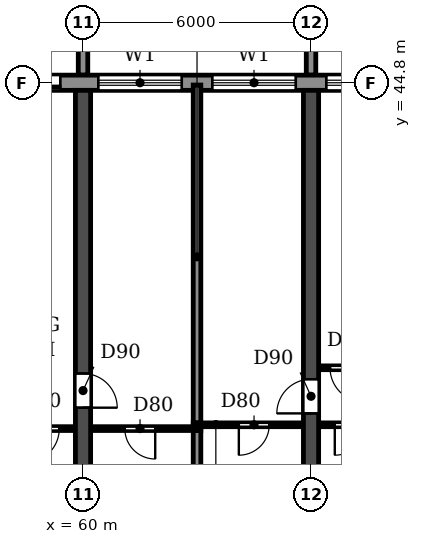
"""IFC4 building model, lengths in metres.
Left out: names, types, materials, properties, quantities, classifications, styles, units other than length and angle.
Written with IfcOpenShell. Run it as: python <this file> out.ifc"""

import sys

from ifc_helpers import new_model, si_unit, direction, frame, frame_2d, origin, place, context, subcontext, project, spatial, polyline, rectangle, outline, extrude, source, transform, mapped, element, fill, save


model = new_model("IFC4")
c1 = context("Model", 3, precision=1e-05, world=origin(), true_north=direction((0.0, 1.0)))
c2 = subcontext(c1, "Body", "Model", "MODEL_VIEW")
j1 = project(units=[si_unit("LENGTHUNIT", "METRE"), si_unit("PLANEANGLEUNIT", "RADIAN")], contexts=[c1])
p1 = place(None, origin())
s1 = spatial("IfcSite", under=j1, at=p1, CompositionType="ELEMENT")
p2 = place(p1, origin())
s2 = spatial("IfcBuilding", under=s1, at=p2, CompositionType="ELEMENT")
p3 = place(p2, frame((0.0, 0.0, 49.8)))
s3 = spatial("IfcBuildingStorey", under=s2, at=p3, CompositionType="ELEMENT", Elevation=49.8)
p4 = place(p3, frame((60.0, 30.55, 0.0), z_axis=(0.0, 0.0, 1.0), x_axis=(0.0, 1.0, 0.0)))
e1 = element("IfcWall", 1, at=p4, inside=s3, PredefinedType="SHEAR", context=c2, shape_type="SweptSolid", body=[
    extrude(rectangle(XDim=14.05, YDim=0.4, at=frame_2d((7.025, 0.0))), origin(), (0.0, 0.0, 1.0), 3.0),
])
p5 = place(p4, frame((5.7, 0.0, 0.0)))
e2 = element("IfcOpeningElement", 2, at=p5, cuts=e1, PredefinedType="OPENING", context=c2, shape_type="SweptSolid", body=[
    extrude(rectangle(XDim=0.9, YDim=2.1, at=frame_2d((0.45, 1.05))), frame((0.0, 0.21, 0.0), z_axis=(0.0, -1.0, 0.0), x_axis=(1.0, 0.0, 0.0)), (0.0, 0.0, 1.0), 0.42),
])
p6 = place(p3, frame((66.0, 30.55, 0.0), z_axis=(0.0, 0.0, 1.0), x_axis=(0.0, 1.0, 0.0)))
e3 = element("IfcWall", 3, at=p6, inside=s3, PredefinedType="SHEAR", context=c2, shape_type="SweptSolid", body=[
    extrude(rectangle(XDim=14.05, YDim=0.4, at=frame_2d((7.025, 0.0))), origin(), (0.0, 0.0, 1.0), 3.0),
])
p7 = place(p6, frame((5.55, 0.0, 0.0)))
e4 = element("IfcOpeningElement", 4, at=p7, cuts=e3, PredefinedType="OPENING", context=c2, shape_type="SweptSolid", body=[
    extrude(rectangle(XDim=0.9, YDim=2.1, at=frame_2d((0.45, 1.05))), frame((0.0, 0.21, 0.0), z_axis=(0.0, -1.0, 0.0), x_axis=(1.0, 0.0, 0.0)), (0.0, 0.0, 1.0), 0.42),
])
p8 = place(p3, frame((97.317, 44.8, 0.0), z_axis=(0.0, 0.0, 1.0), x_axis=(-1.0, 0.0, 0.0)))
e5 = element("IfcWall", 5, at=p8, inside=s3, PredefinedType="STANDARD", context=c2, shape_type="SweptSolid", body=[
    extrude(rectangle(XDim=92.634, YDim=0.4, at=frame_2d((46.317, 0.0))), origin(), (0.0, 0.0, 1.0), 3.0),
])
p9 = place(p8, frame((88.917, 0.0, 0.0)))
e6 = element("IfcOpeningElement", 6, at=p9, cuts=e5, PredefinedType="OPENING", context=c2, shape_type="SweptSolid", body=[
    extrude(rectangle(XDim=1.8, YDim=2.4, at=frame_2d((0.9, 1.2))), frame((0.0, 0.21, 0.0), z_axis=(0.0, -1.0, 0.0), x_axis=(1.0, 0.0, 0.0)), (0.0, 0.0, 1.0), 0.42),
])
p10 = place(p8, frame((85.717, 0.0, 0.9)))
e7 = element("IfcOpeningElement", 7, at=p10, cuts=e5, PredefinedType="OPENING", context=c2, shape_type="SweptSolid", body=[
    extrude(rectangle(XDim=2.2, YDim=1.5, at=frame_2d((1.1, 0.75))), frame((0.0, 0.21, 0.0), z_axis=(0.0, -1.0, 0.0), x_axis=(1.0, 0.0, 0.0)), (0.0, 0.0, 1.0), 0.42),
])
p11 = place(p8, frame((82.717, 0.0, 0.9)))
e8 = element("IfcOpeningElement", 8, at=p11, cuts=e5, PredefinedType="OPENING", context=c2, shape_type="SweptSolid", body=[
    extrude(rectangle(XDim=2.2, YDim=1.5, at=frame_2d((1.1, 0.75))), frame((0.0, 0.21, 0.0), z_axis=(0.0, -1.0, 0.0), x_axis=(1.0, 0.0, 0.0)), (0.0, 0.0, 1.0), 0.42),
])
p12 = place(p8, frame((79.717, 0.0, 0.9)))
e9 = element("IfcOpeningElement", 9, at=p12, cuts=e5, PredefinedType="OPENING", context=c2, shape_type="SweptSolid", body=[
    extrude(rectangle(XDim=2.2, YDim=1.5, at=frame_2d((1.1, 0.75))), frame((0.0, 0.21, 0.0), z_axis=(0.0, -1.0, 0.0), x_axis=(1.0, 0.0, 0.0)), (0.0, 0.0, 1.0), 0.42),
])
p13 = place(p8, frame((76.717, 0.0, 0.9)))
e10 = element("IfcOpeningElement", 10, at=p13, cuts=e5, PredefinedType="OPENING", context=c2, shape_type="SweptSolid", body=[
    extrude(rectangle(XDim=2.2, YDim=1.5, at=frame_2d((1.1, 0.75))), frame((0.0, 0.21, 0.0), z_axis=(0.0, -1.0, 0.0), x_axis=(1.0, 0.0, 0.0)), (0.0, 0.0, 1.0), 0.42),
])
p14 = place(p8, frame((73.917, 0.0, 0.0)))
e11 = element("IfcOpeningElement", 11, at=p14, cuts=e5, PredefinedType="OPENING", context=c2, shape_type="SweptSolid", body=[
    extrude(rectangle(XDim=1.8, YDim=2.4, at=frame_2d((0.9, 1.2))), frame((0.0, 0.21, 0.0), z_axis=(0.0, -1.0, 0.0), x_axis=(1.0, 0.0, 0.0)), (0.0, 0.0, 1.0), 0.42),
])
p15 = place(p8, frame((70.717, 0.0, 0.9)))
e12 = element("IfcOpeningElement", 12, at=p15, cuts=e5, PredefinedType="OPENING", context=c2, shape_type="SweptSolid", body=[
    extrude(rectangle(XDim=2.2, YDim=1.5, at=frame_2d((1.1, 0.75))), frame((0.0, 0.21, 0.0), z_axis=(0.0, -1.0, 0.0), x_axis=(1.0, 0.0, 0.0)), (0.0, 0.0, 1.0), 0.42),
])
p16 = place(p8, frame((67.717, 0.0, 0.9)))
e13 = element("IfcOpeningElement", 13, at=p16, cuts=e5, PredefinedType="OPENING", context=c2, shape_type="SweptSolid", body=[
    extrude(rectangle(XDim=2.2, YDim=1.5, at=frame_2d((1.1, 0.75))), frame((0.0, 0.21, 0.0), z_axis=(0.0, -1.0, 0.0), x_axis=(1.0, 0.0, 0.0)), (0.0, 0.0, 1.0), 0.42),
])
p17 = place(p8, frame((64.717, 0.0, 0.9)))
e14 = element("IfcOpeningElement", 14, at=p17, cuts=e5, PredefinedType="OPENING", context=c2, shape_type="SweptSolid", body=[
    extrude(rectangle(XDim=2.2, YDim=1.5, at=frame_2d((1.1, 0.75))), frame((0.0, 0.21, 0.0), z_axis=(0.0, -1.0, 0.0), x_axis=(1.0, 0.0, 0.0)), (0.0, 0.0, 1.0), 0.42),
])
p18 = place(p8, frame((61.917, 0.0, 0.0)))
e15 = element("IfcOpeningElement", 15, at=p18, cuts=e5, PredefinedType="OPENING", context=c2, shape_type="SweptSolid", body=[
    extrude(rectangle(XDim=1.8, YDim=2.4, at=frame_2d((0.9, 1.2))), frame((0.0, 0.21, 0.0), z_axis=(0.0, -1.0, 0.0), x_axis=(1.0, 0.0, 0.0)), (0.0, 0.0, 1.0), 0.42),
])
p19 = place(p8, frame((58.717, 0.0, 0.9)))
e16 = element("IfcOpeningElement", 16, at=p19, cuts=e5, PredefinedType="OPENING", context=c2, shape_type="SweptSolid", body=[
    extrude(rectangle(XDim=2.2, YDim=1.5, at=frame_2d((1.1, 0.75))), frame((0.0, 0.21, 0.0), z_axis=(0.0, -1.0, 0.0), x_axis=(1.0, 0.0, 0.0)), (0.0, 0.0, 1.0), 0.42),
])
p20 = place(p8, frame((55.717, 0.0, 0.9)))
e17 = element("IfcOpeningElement", 17, at=p20, cuts=e5, PredefinedType="OPENING", context=c2, shape_type="SweptSolid", body=[
    extrude(rectangle(XDim=2.2, YDim=1.5, at=frame_2d((1.1, 0.75))), frame((0.0, 0.21, 0.0), z_axis=(0.0, -1.0, 0.0), x_axis=(1.0, 0.0, 0.0)), (0.0, 0.0, 1.0), 0.42),
])
p21 = place(p8, frame((52.717, 0.0, 0.9)))
e18 = element("IfcOpeningElement", 18, at=p21, cuts=e5, PredefinedType="OPENING", context=c2, shape_type="SweptSolid", body=[
    extrude(rectangle(XDim=2.2, YDim=1.5, at=frame_2d((1.1, 0.75))), frame((0.0, 0.21, 0.0), z_axis=(0.0, -1.0, 0.0), x_axis=(1.0, 0.0, 0.0)), (0.0, 0.0, 1.0), 0.42),
])
p22 = place(p8, frame((49.917, 0.0, 0.0)))
e19 = element("IfcOpeningElement", 19, at=p22, cuts=e5, PredefinedType="OPENING", context=c2, shape_type="SweptSolid", body=[
    extrude(rectangle(XDim=1.8, YDim=2.4, at=frame_2d((0.9, 1.2))), frame((0.0, 0.21, 0.0), z_axis=(0.0, -1.0, 0.0), x_axis=(1.0, 0.0, 0.0)), (0.0, 0.0, 1.0), 0.42),
])
p23 = place(p8, frame((46.717, 0.0, 0.9)))
e20 = element("IfcOpeningElement", 20, at=p23, cuts=e5, PredefinedType="OPENING", context=c2, shape_type="SweptSolid", body=[
    extrude(rectangle(XDim=2.2, YDim=1.5, at=frame_2d((1.1, 0.75))), frame((0.0, 0.21, 0.0), z_axis=(0.0, -1.0, 0.0), x_axis=(1.0, 0.0, 0.0)), (0.0, 0.0, 1.0), 0.42),
])
p24 = place(p8, frame((43.717, 0.0, 0.9)))
e21 = element("IfcOpeningElement", 21, at=p24, cuts=e5, PredefinedType="OPENING", context=c2, shape_type="SweptSolid", body=[
    extrude(rectangle(XDim=2.2, YDim=1.5, at=frame_2d((1.1, 0.75))), frame((0.0, 0.21, 0.0), z_axis=(0.0, -1.0, 0.0), x_axis=(1.0, 0.0, 0.0)), (0.0, 0.0, 1.0), 0.42),
])
p25 = place(p8, frame((40.717, 0.0, 0.9)))
e22 = element("IfcOpeningElement", 22, at=p25, cuts=e5, PredefinedType="OPENING", context=c2, shape_type="SweptSolid", body=[
    extrude(rectangle(XDim=2.2, YDim=1.5, at=frame_2d((1.1, 0.75))), frame((0.0, 0.21, 0.0), z_axis=(0.0, -1.0, 0.0), x_axis=(1.0, 0.0, 0.0)), (0.0, 0.0, 1.0), 0.42),
])
p26 = place(p8, frame((37.917, 0.0, 0.0)))
e23 = element("IfcOpeningElement", 23, at=p26, cuts=e5, PredefinedType="OPENING", context=c2, shape_type="SweptSolid", body=[
    extrude(rectangle(XDim=1.8, YDim=2.4, at=frame_2d((0.9, 1.2))), frame((0.0, 0.21, 0.0), z_axis=(0.0, -1.0, 0.0), x_axis=(1.0, 0.0, 0.0)), (0.0, 0.0, 1.0), 0.42),
])
p27 = place(p8, frame((34.717, 0.0, 0.9)))
e24 = element("IfcOpeningElement", 24, at=p27, cuts=e5, PredefinedType="OPENING", context=c2, shape_type="SweptSolid", body=[
    extrude(rectangle(XDim=2.2, YDim=1.5, at=frame_2d((1.1, 0.75))), frame((0.0, 0.21, 0.0), z_axis=(0.0, -1.0, 0.0), x_axis=(1.0, 0.0, 0.0)), (0.0, 0.0, 1.0), 0.42),
])
p28 = place(p8, frame((31.717, 0.0, 0.9)))
e25 = element("IfcOpeningElement", 25, at=p28, cuts=e5, PredefinedType="OPENING", context=c2, shape_type="SweptSolid", body=[
    extrude(rectangle(XDim=2.2, YDim=1.5, at=frame_2d((1.1, 0.75))), frame((0.0, 0.21, 0.0), z_axis=(0.0, -1.0, 0.0), x_axis=(1.0, 0.0, 0.0)), (0.0, 0.0, 1.0), 0.42),
])
p29 = place(p8, frame((28.717, 0.0, 0.9)))
e26 = element("IfcOpeningElement", 26, at=p29, cuts=e5, PredefinedType="OPENING", context=c2, shape_type="SweptSolid", body=[
    extrude(rectangle(XDim=2.2, YDim=1.5, at=frame_2d((1.1, 0.75))), frame((0.0, 0.21, 0.0), z_axis=(0.0, -1.0, 0.0), x_axis=(1.0, 0.0, 0.0)), (0.0, 0.0, 1.0), 0.42),
])
p30 = place(p8, frame((25.917, 0.0, 0.0)))
e27 = element("IfcOpeningElement", 27, at=p30, cuts=e5, PredefinedType="OPENING", context=c2, shape_type="SweptSolid", body=[
    extrude(rectangle(XDim=1.8, YDim=2.4, at=frame_2d((0.9, 1.2))), frame((0.0, 0.21, 0.0), z_axis=(0.0, -1.0, 0.0), x_axis=(1.0, 0.0, 0.0)), (0.0, 0.0, 1.0), 0.42),
])
p31 = place(p8, frame((22.917, 0.0, 0.0)))
e28 = element("IfcOpeningElement", 28, at=p31, cuts=e5, PredefinedType="OPENING", context=c2, shape_type="SweptSolid", body=[
    extrude(rectangle(XDim=1.8, YDim=2.4, at=frame_2d((0.9, 1.2))), frame((0.0, 0.21, 0.0), z_axis=(0.0, -1.0, 0.0), x_axis=(1.0, 0.0, 0.0)), (0.0, 0.0, 1.0), 0.42),
])
p32 = place(p8, frame((19.717, 0.0, 0.9)))
e29 = element("IfcOpeningElement", 29, at=p32, cuts=e5, PredefinedType="OPENING", context=c2, shape_type="SweptSolid", body=[
    extrude(rectangle(XDim=2.2, YDim=1.5, at=frame_2d((1.1, 0.75))), frame((0.0, 0.21, 0.0), z_axis=(0.0, -1.0, 0.0), x_axis=(1.0, 0.0, 0.0)), (0.0, 0.0, 1.0), 0.42),
])
p33 = place(p8, frame((16.717, 0.0, 0.9)))
e30 = element("IfcOpeningElement", 30, at=p33, cuts=e5, PredefinedType="OPENING", context=c2, shape_type="SweptSolid", body=[
    extrude(rectangle(XDim=2.2, YDim=1.5, at=frame_2d((1.1, 0.75))), frame((0.0, 0.21, 0.0), z_axis=(0.0, -1.0, 0.0), x_axis=(1.0, 0.0, 0.0)), (0.0, 0.0, 1.0), 0.42),
])
p34 = place(p8, frame((13.717, 0.0, 0.9)))
e31 = element("IfcOpeningElement", 31, at=p34, cuts=e5, PredefinedType="OPENING", context=c2, shape_type="SweptSolid", body=[
    extrude(rectangle(XDim=2.2, YDim=1.5, at=frame_2d((1.1, 0.75))), frame((0.0, 0.21, 0.0), z_axis=(0.0, -1.0, 0.0), x_axis=(1.0, 0.0, 0.0)), (0.0, 0.0, 1.0), 0.42),
])
p35 = place(p8, frame((10.717, 0.0, 0.9)))
e32 = element("IfcOpeningElement", 32, at=p35, cuts=e5, PredefinedType="OPENING", context=c2, shape_type="SweptSolid", body=[
    extrude(rectangle(XDim=2.2, YDim=1.5, at=frame_2d((1.1, 0.75))), frame((0.0, 0.21, 0.0), z_axis=(0.0, -1.0, 0.0), x_axis=(1.0, 0.0, 0.0)), (0.0, 0.0, 1.0), 0.42),
])
p36 = place(p8, frame((7.917, 0.0, 0.0)))
e33 = element("IfcOpeningElement", 33, at=p36, cuts=e5, PredefinedType="OPENING", context=c2, shape_type="SweptSolid", body=[
    extrude(rectangle(XDim=1.8, YDim=2.4, at=frame_2d((0.9, 1.2))), frame((0.0, 0.21, 0.0), z_axis=(0.0, -1.0, 0.0), x_axis=(1.0, 0.0, 0.0)), (0.0, 0.0, 1.0), 0.42),
])
p37 = place(p8, frame((4.717, 0.0, 0.9)))
e34 = element("IfcOpeningElement", 34, at=p37, cuts=e5, PredefinedType="OPENING", context=c2, shape_type="SweptSolid", body=[
    extrude(rectangle(XDim=2.2, YDim=1.5, at=frame_2d((1.1, 0.75))), frame((0.0, 0.21, 0.0), z_axis=(0.0, -1.0, 0.0), x_axis=(1.0, 0.0, 0.0)), (0.0, 0.0, 1.0), 0.42),
])
p38 = place(p8, frame((1.917, 0.0, 0.0)))
e35 = element("IfcOpeningElement", 35, at=p38, cuts=e5, PredefinedType="OPENING", context=c2, shape_type="SweptSolid", body=[
    extrude(rectangle(XDim=1.8, YDim=2.4, at=frame_2d((0.9, 1.2))), frame((0.0, 0.21, 0.0), z_axis=(0.0, -1.0, 0.0), x_axis=(1.0, 0.0, 0.0)), (0.0, 0.0, 1.0), 0.42),
])
m1 = source(origin(), c2, "Body", "SweptSolid", [
    extrude(outline(polyline([(0.0, 0.0), (0.25, 0.0), (0.25, 3.1), (0.0, 3.1), (0.0, 0.0)])), origin(), (0.0, 0.0, 1.0), 3.1),
])
for number, where in (
    (36, (59.875, 45.0, 0.0)),
    (37, (65.875, 45.0, 0.0)),
):
    element("IfcWall", number, at=place(p3, frame(where)), inside=s3, PredefinedType="STANDARD", context=c2, shape_type="MappedRepresentation", body=[
        mapped(m1, transform((0.0, 0.0, 0.0))),
    ])
p39 = place(p3, frame((63.0, 30.56, 0.0), z_axis=(0.0, 0.0, 1.0), x_axis=(0.0, 1.0, 0.0)))
e38 = element("IfcWall", 38, at=p39, inside=s3, PredefinedType="PARTITIONING", context=c2, shape_type="SweptSolid", body=[
    extrude(rectangle(XDim=5.09, YDim=0.2, at=frame_2d((2.545, 0.0))), origin(), (0.0, 0.0, 1.0), 3.0),
])
p40 = place(p3, frame((63.0, 35.85, 0.0), z_axis=(0.0, 0.0, 1.0), x_axis=(0.0, 1.0, 0.0)))
e39 = element("IfcWall", 39, at=p40, inside=s3, PredefinedType="PARTITIONING", context=c2, shape_type="SweptSolid", body=[
    extrude(rectangle(XDim=8.89, YDim=0.2, at=frame_2d((4.445, 0.0))), origin(), (0.0, 0.0, 1.0), 3.0),
])
p41 = place(p3, frame((57.8, 35.7, 0.0), z_axis=(0.0, 0.0, 1.0), x_axis=(1.0, 0.0, 0.0)))
e40 = element("IfcWall", 40, at=p41, inside=s3, PredefinedType="PARTITIONING", context=c2, shape_type="SweptSolid", body=[
    extrude(rectangle(XDim=1.99, YDim=0.1, at=frame_2d((0.995, 0.0))), origin(), (0.0, 0.0, 1.0), 3.0),
])
p42 = place(p41, frame((0.675, 0.0, 0.0)))
e41 = element("IfcOpeningElement", 41, at=p42, cuts=e40, PredefinedType="OPENING", context=c2, shape_type="SweptSolid", body=[
    extrude(rectangle(XDim=0.9, YDim=2.1, at=frame_2d((0.45, 1.05))), frame((0.0, 0.06, 0.0), z_axis=(0.0, -1.0, 0.0), x_axis=(1.0, 0.0, 0.0)), (0.0, 0.0, 1.0), 0.12),
])
p43 = place(p3, frame((60.21, 35.7, 0.0), z_axis=(0.0, 0.0, 1.0), x_axis=(1.0, 0.0, 0.0)))
e42 = element("IfcWall", 42, at=p43, inside=s3, PredefinedType="PARTITIONING", context=c2, shape_type="SweptSolid", body=[
    extrude(rectangle(XDim=2.89, YDim=0.1, at=frame_2d((1.445, 0.0))), origin(), (0.0, 0.0, 1.0), 3.0),
])
p44 = place(p43, frame((0.89, 0.0, 0.0)))
e43 = element("IfcOpeningElement", 43, at=p44, cuts=e42, PredefinedType="OPENING", context=c2, shape_type="SweptSolid", body=[
    extrude(rectangle(XDim=0.8, YDim=2.1, at=frame_2d((0.4, 1.05))), frame((0.0, 0.06, 0.0), z_axis=(0.0, -1.0, 0.0), x_axis=(1.0, 0.0, 0.0)), (0.0, 0.0, 1.0), 0.12),
])
p45 = place(p3, frame((62.9, 35.8, 0.0), z_axis=(0.0, 0.0, 1.0), x_axis=(1.0, 0.0, 0.0)))
e44 = element("IfcWall", 44, at=p45, inside=s3, PredefinedType="PARTITIONING", context=c2, shape_type="SweptSolid", body=[
    extrude(rectangle(XDim=2.89, YDim=0.1, at=frame_2d((1.445, 0.0))), origin(), (0.0, 0.0, 1.0), 3.0),
])
p46 = place(p45, frame((1.2, 0.0, 0.0)))
e45 = element("IfcOpeningElement", 45, at=p46, cuts=e44, PredefinedType="OPENING", context=c2, shape_type="SweptSolid", body=[
    extrude(rectangle(XDim=0.8, YDim=2.1, at=frame_2d((0.4, 1.05))), frame((0.0, 0.06, 0.0), z_axis=(0.0, -1.0, 0.0), x_axis=(1.0, 0.0, 0.0)), (0.0, 0.0, 1.0), 0.12),
])
p47 = place(p3, frame((66.21, 35.8, 0.0), z_axis=(0.0, 0.0, 1.0), x_axis=(1.0, 0.0, 0.0)))
e46 = element("IfcWall", 46, at=p47, inside=s3, PredefinedType="PARTITIONING", context=c2, shape_type="SweptSolid", body=[
    extrude(rectangle(XDim=1.89, YDim=0.1, at=frame_2d((0.945, 0.0))), origin(), (0.0, 0.0, 1.0), 3.0),
])
p48 = place(p47, frame((0.415, 0.0, 0.0)))
e47 = element("IfcOpeningElement", 47, at=p48, cuts=e46, PredefinedType="OPENING", context=c2, shape_type="SweptSolid", body=[
    extrude(rectangle(XDim=0.8, YDim=2.1, at=frame_2d((0.4, 1.05))), frame((0.0, 0.06, 0.0), z_axis=(0.0, -1.0, 0.0), x_axis=(1.0, 0.0, 0.0)), (0.0, 0.0, 1.0), 0.12),
])
p49 = place(p3, frame((66.21, 37.3, 0.0), z_axis=(0.0, 0.0, 1.0), x_axis=(1.0, 0.0, 0.0)))
e48 = element("IfcWall", 48, at=p49, inside=s3, PredefinedType="PARTITIONING", context=c2, shape_type="SweptSolid", body=[
    extrude(rectangle(XDim=2.84, YDim=0.1, at=frame_2d((1.42, 0.0))), origin(), (0.0, 0.0, 1.0), 3.0),
])
p50 = place(p49, frame((0.29, 0.0, 0.0)))
e49 = element("IfcOpeningElement", 49, at=p50, cuts=e48, PredefinedType="OPENING", context=c2, shape_type="SweptSolid", body=[
    extrude(rectangle(XDim=0.9, YDim=2.1, at=frame_2d((0.45, 1.05))), frame((0.0, 0.06, 0.0), z_axis=(0.0, -1.0, 0.0), x_axis=(1.0, 0.0, 0.0)), (0.0, 0.0, 1.0), 0.12),
])
p51 = place(p26, origin())
e50 = element("IfcDoor", 50, at=p51, inside=s3, OperationType="DOUBLE_DOOR_SLIDING", PredefinedType="DOOR", context=c2, shape_type="SweptSolid", body=[
    extrude(rectangle(XDim=1.8, YDim=2.4, at=frame_2d((0.9, 1.2))), frame((0.0, 0.025, 0.0), z_axis=(0.0, -1.0, 0.0), x_axis=(1.0, 0.0, 0.0)), (0.0, 0.0, 1.0), 0.05),
])
fill(e23, e50)
p52 = place(p27, origin())
e51 = element("IfcWindow", 51, at=p52, inside=s3, PartitioningType="DOUBLE_PANEL_HORIZONTAL", PredefinedType="WINDOW", context=c2, shape_type="SweptSolid", body=[
    extrude(rectangle(XDim=2.2, YDim=1.5, at=frame_2d((1.1, 0.75))), frame((0.0, 0.03, 0.0), z_axis=(0.0, -1.0, 0.0), x_axis=(1.0, 0.0, 0.0)), (0.0, 0.0, 1.0), 0.06),
])
fill(e24, e51)
p53 = place(p28, origin())
e52 = element("IfcWindow", 52, at=p53, inside=s3, PartitioningType="DOUBLE_PANEL_HORIZONTAL", PredefinedType="WINDOW", context=c2, shape_type="SweptSolid", body=[
    extrude(rectangle(XDim=2.2, YDim=1.5, at=frame_2d((1.1, 0.75))), frame((0.0, 0.03, 0.0), z_axis=(0.0, -1.0, 0.0), x_axis=(1.0, 0.0, 0.0)), (0.0, 0.0, 1.0), 0.06),
])
fill(e25, e52)
p54 = place(p29, origin())
e53 = element("IfcWindow", 53, at=p54, inside=s3, PartitioningType="DOUBLE_PANEL_HORIZONTAL", PredefinedType="WINDOW", context=c2, shape_type="SweptSolid", body=[
    extrude(rectangle(XDim=2.2, YDim=1.5, at=frame_2d((1.1, 0.75))), frame((0.0, 0.03, 0.0), z_axis=(0.0, -1.0, 0.0), x_axis=(1.0, 0.0, 0.0)), (0.0, 0.0, 1.0), 0.06),
])
fill(e26, e53)
p55 = place(p44, frame((0.8, 0.0, 0.0), z_axis=(0.0, 0.0, 1.0), x_axis=(-1.0, 0.0, 0.0)))
e54 = element("IfcDoor", 54, at=p55, inside=s3, OperationType="SINGLE_SWING_LEFT", PredefinedType="DOOR", context=c2, shape_type="SweptSolid", body=[
    extrude(rectangle(XDim=0.8, YDim=2.1, at=frame_2d((0.4, 1.05))), frame((0.0, 0.025, 0.0), z_axis=(0.0, -1.0, 0.0), x_axis=(1.0, 0.0, 0.0)), (0.0, 0.0, 1.0), 0.05),
])
fill(e43, e54)
p56 = place(p42, frame((0.9, 0.0, 0.0), z_axis=(0.0, 0.0, 1.0), x_axis=(-1.0, 0.0, 0.0)))
e55 = element("IfcDoor", 55, at=p56, inside=s3, OperationType="SINGLE_SWING_RIGHT", PredefinedType="DOOR", context=c2, shape_type="SweptSolid", body=[
    extrude(rectangle(XDim=0.9, YDim=2.1, at=frame_2d((0.45, 1.05))), frame((0.0, 0.025, 0.0), z_axis=(0.0, -1.0, 0.0), x_axis=(1.0, 0.0, 0.0)), (0.0, 0.0, 1.0), 0.05),
])
fill(e41, e55)
p57 = place(p5, frame((0.9, 0.0, 0.0), z_axis=(0.0, 0.0, 1.0), x_axis=(-1.0, 0.0, 0.0)))
e56 = element("IfcDoor", 56, at=p57, inside=s3, OperationType="SINGLE_SWING_RIGHT", PredefinedType="DOOR", context=c2, shape_type="SweptSolid", body=[
    extrude(rectangle(XDim=0.9, YDim=2.1, at=frame_2d((0.45, 1.05))), frame((0.0, 0.025, 0.0), z_axis=(0.0, -1.0, 0.0), x_axis=(1.0, 0.0, 0.0)), (0.0, 0.0, 1.0), 0.05),
])
fill(e2, e56)
p58 = place(p46, frame((0.8, 0.0, 0.0), z_axis=(0.0, 0.0, 1.0), x_axis=(-1.0, 0.0, 0.0)))
e57 = element("IfcDoor", 57, at=p58, inside=s3, OperationType="SINGLE_SWING_RIGHT", PredefinedType="DOOR", context=c2, shape_type="SweptSolid", body=[
    extrude(rectangle(XDim=0.8, YDim=2.1, at=frame_2d((0.4, 1.05))), frame((0.0, 0.025, 0.0), z_axis=(0.0, -1.0, 0.0), x_axis=(1.0, 0.0, 0.0)), (0.0, 0.0, 1.0), 0.05),
])
fill(e45, e57)
p59 = place(p7, origin())
e58 = element("IfcDoor", 58, at=p59, inside=s3, OperationType="SINGLE_SWING_LEFT", PredefinedType="DOOR", context=c2, shape_type="SweptSolid", body=[
    extrude(rectangle(XDim=0.9, YDim=2.1, at=frame_2d((0.45, 1.05))), frame((0.0, 0.025, 0.0), z_axis=(0.0, -1.0, 0.0), x_axis=(1.0, 0.0, 0.0)), (0.0, 0.0, 1.0), 0.05),
])
fill(e4, e58)
p60 = place(p50, frame((0.9, 0.0, 0.0), z_axis=(0.0, 0.0, 1.0), x_axis=(-1.0, 0.0, 0.0)))
e59 = element("IfcDoor", 59, at=p60, inside=s3, OperationType="SINGLE_SWING_LEFT", PredefinedType="DOOR", context=c2, shape_type="SweptSolid", body=[
    extrude(rectangle(XDim=0.9, YDim=2.1, at=frame_2d((0.45, 1.05))), frame((0.0, 0.025, 0.0), z_axis=(0.0, -1.0, 0.0), x_axis=(1.0, 0.0, 0.0)), (0.0, 0.0, 1.0), 0.05),
])
fill(e49, e59)
p61 = place(p48, frame((0.8, 0.0, 0.0), z_axis=(0.0, 0.0, 1.0), x_axis=(-1.0, 0.0, 0.0)))
e60 = element("IfcDoor", 60, at=p61, inside=s3, OperationType="SINGLE_SWING_RIGHT", PredefinedType="DOOR", context=c2, shape_type="SweptSolid", body=[
    extrude(rectangle(XDim=0.8, YDim=2.1, at=frame_2d((0.4, 1.05))), frame((0.0, 0.025, 0.0), z_axis=(0.0, -1.0, 0.0), x_axis=(1.0, 0.0, 0.0)), (0.0, 0.0, 1.0), 0.05),
])
fill(e47, e60)
save(model, sys.argv[1])
